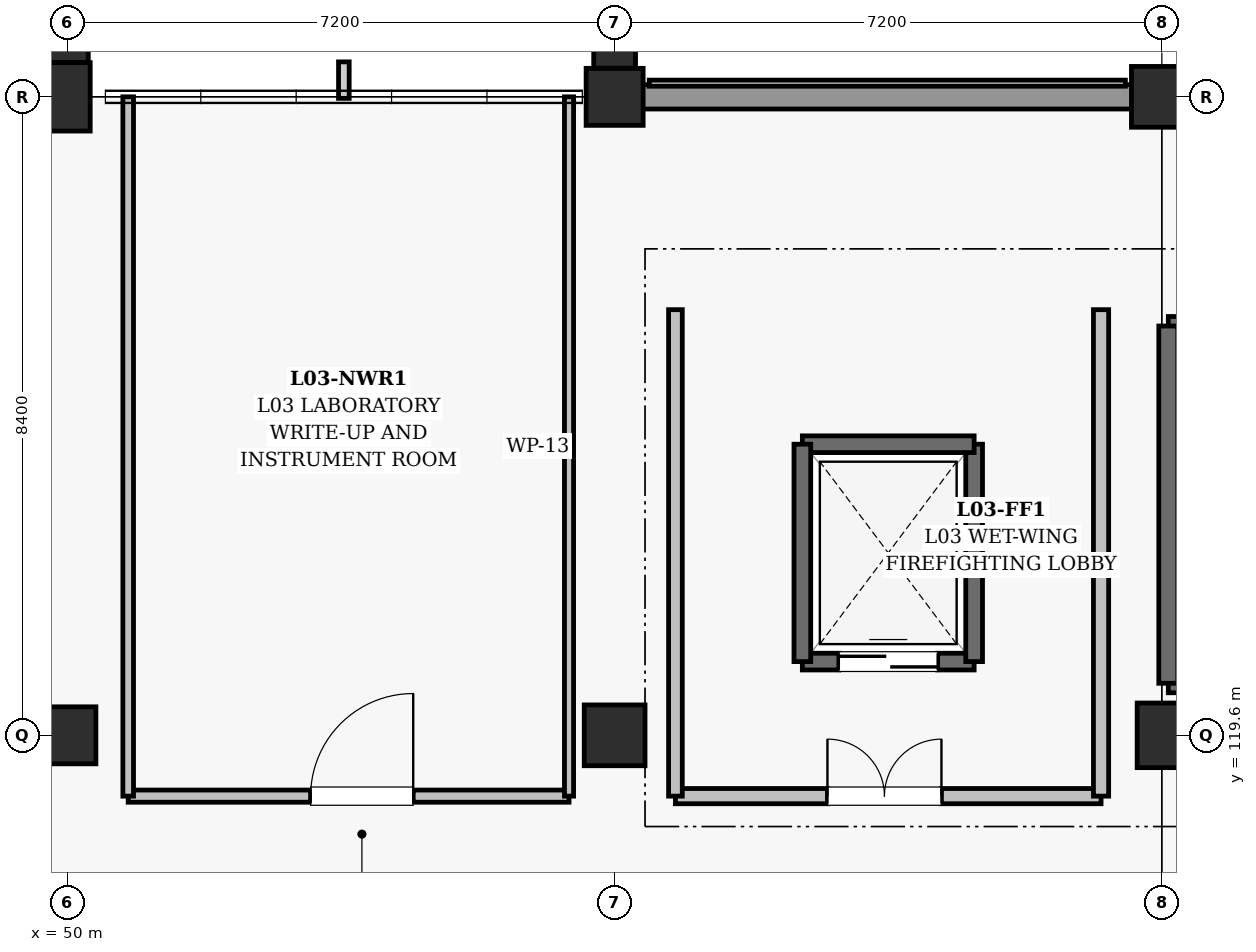
"""IFC4 building model, lengths in metres.
Left out: names, types, materials, properties, quantities, classifications, styles, units other than length and angle.
Written with IfcOpenShell. Run it as: python <this file> out.ifc"""

import sys

from ifc_helpers import new_model, si_unit, direction, frame, frame_2d, origin, origin_2d, place, context, subcontext, project, spatial, rectangle, extrude, element, fill, save


model = new_model("IFC4")
c1 = context("Model", 3, precision=1e-05, world=origin(), true_north=direction((0.0, 1.0)))
c2 = subcontext(c1, "Body", "Model", "MODEL_VIEW")
j1 = project(units=[si_unit("LENGTHUNIT", "METRE"), si_unit("PLANEANGLEUNIT", "RADIAN")], contexts=[c1])
p1 = place(None, origin())
s1 = spatial("IfcSite", under=j1, at=p1, CompositionType="ELEMENT")
p2 = place(p1, origin())
s2 = spatial("IfcBuilding", under=s1, at=p2, CompositionType="ELEMENT")
p3 = place(p2, frame((0.0, 0.0, 14.4)))
s3 = spatial("IfcBuildingStorey", under=s2, at=p3, CompositionType="ELEMENT", Elevation=14.4)
p4 = place(p3, frame((50.0, 119.6, 0.0), z_axis=(0.0, 0.0, 1.0), x_axis=(1.0, 0.0, 0.0)))
e1 = element("IfcColumn", 1, at=p4, inside=s3, PredefinedType="COLUMN", context=c2, shape_type="SweptSolid", body=[
    extrude(rectangle(XDim=0.75, YDim=0.75, at=origin_2d()), origin(), (0.0, 0.0, 1.0), 4.5),
])
p5 = place(p3, frame((50.0, 128.0, 0.0), z_axis=(0.0, 0.0, 1.0), x_axis=(1.0, 0.0, 0.0)))
e2 = element("IfcColumn", 2, at=p5, inside=s3, PredefinedType="COLUMN", context=c2, shape_type="SweptSolid", body=[
    extrude(rectangle(XDim=0.6, YDim=0.9, at=origin_2d()), origin(), (0.0, 0.0, 1.0), 4.5),
])
p6 = place(p3, frame((57.2, 119.6, 0.0), z_axis=(0.0, 0.0, 1.0), x_axis=(1.0, 0.0, 0.0)))
e3 = element("IfcColumn", 3, at=p6, inside=s3, PredefinedType="COLUMN", context=c2, shape_type="SweptSolid", body=[
    extrude(rectangle(XDim=0.8, YDim=0.8, at=origin_2d()), origin(), (0.0, 0.0, 1.0), 4.5),
])
p7 = place(p3, frame((57.2, 128.0, 0.0), z_axis=(0.0, 0.0, 1.0), x_axis=(1.0, 0.0, 0.0)))
e4 = element("IfcColumn", 4, at=p7, inside=s3, PredefinedType="COLUMN", context=c2, shape_type="SweptSolid", body=[
    extrude(rectangle(XDim=0.75, YDim=0.75, at=origin_2d()), origin(), (0.0, 0.0, 1.0), 4.5),
])
p8 = place(p3, frame((64.4, 119.6, 0.0), z_axis=(0.0, 0.0, 1.0), x_axis=(1.0, 0.0, 0.0)))
e5 = element("IfcColumn", 5, at=p8, inside=s3, PredefinedType="COLUMN", context=c2, shape_type="SweptSolid", body=[
    extrude(rectangle(XDim=0.65, YDim=0.85, at=origin_2d()), origin(), (0.0, 0.0, 1.0), 4.5),
])
p9 = place(p3, frame((64.4, 128.0, 0.0), z_axis=(0.0, 0.0, 1.0), x_axis=(1.0, 0.0, 0.0)))
e6 = element("IfcColumn", 6, at=p9, inside=s3, PredefinedType="COLUMN", context=c2, shape_type="SweptSolid", body=[
    extrude(rectangle(XDim=0.8, YDim=0.8, at=origin_2d()), origin(), (0.0, 0.0, 1.0), 4.5),
])
for number, where, z_axis, x_axis in (
    (7, (50.0, 128.853, 0.0), (0.0, 0.0, 1.0), (1.0, 0.0, 0.0)),
    (8, (57.2, 128.778, 0.0), (0.0, 0.0, 1.0), (1.0, 0.0, 0.0)),
):
    element("IfcColumn", number, at=place(p3, frame(where, z_axis=z_axis, x_axis=x_axis)), inside=s3, PredefinedType="PILASTER", context=c2, shape_type="SweptSolid", body=[
        extrude(rectangle(XDim=0.55, YDim=0.8, at=origin_2d()), origin(), (0.0, 0.0, 1.0), 4.5),
    ])
p10 = place(p3, frame((57.555, 128.0, 0.0), z_axis=(0.0, 0.0, 1.0), x_axis=(1.0, 0.0, 0.0)))
e9 = element("IfcWall", 9, at=p10, inside=s3, PredefinedType="SOLIDWALL", context=c2, shape_type="SweptSolid", body=[
    extrude(rectangle(XDim=6.465, YDim=0.32, at=frame_2d((3.232, 0.0))), origin(), (0.0, 0.0, 1.0), 3.305),
])
p11 = place(p3, frame((64.485, 120.285, 0.0), z_axis=(0.0, 0.0, 1.0), x_axis=(1.0, 0.0, 0.0)))
e10 = element("IfcWall", 10, at=p11, inside=s3, PredefinedType="SHEAR", context=c2, shape_type="SweptSolid", body=[
    extrude(rectangle(XDim=10.63, YDim=0.25, at=frame_2d((5.315, 0.0))), origin(), (0.0, 0.0, 1.0), 4.175),
])
p12 = place(p11, frame((0.55, 0.0, 0.0)))
e11 = element("IfcOpeningElement", 11, at=p12, cuts=e10, PredefinedType="OPENING", context=c2, shape_type="SweptSolid", body=[
    extrude(rectangle(XDim=1.2, YDim=2.15, at=frame_2d((0.6, 1.075))), frame((0.0, 0.135, 0.0), z_axis=(0.0, -1.0, 0.0), x_axis=(1.0, 0.0, 0.0)), (0.0, 0.0, 1.0), 0.27),
])
p13 = place(p3, frame((75.115, 124.985, 0.0), z_axis=(0.0, 0.0, 1.0), x_axis=(-1.0, 0.0, 0.0)))
e12 = element("IfcWall", 12, at=p13, inside=s3, PredefinedType="SHEAR", context=c2, shape_type="SweptSolid", body=[
    extrude(rectangle(XDim=10.63, YDim=0.25, at=frame_2d((5.315, 0.0))), origin(), (0.0, 0.0, 1.0), 4.175),
])
p14 = place(p3, frame((64.485, 124.985, 0.0), z_axis=(0.0, 0.0, 1.0), x_axis=(0.0, -1.0, 0.0)))
e13 = element("IfcWall", 13, at=p14, inside=s3, PredefinedType="SHEAR", context=c2, shape_type="SweptSolid", body=[
    extrude(rectangle(XDim=4.7, YDim=0.25, at=frame_2d((2.35, 0.0))), origin(), (0.0, 0.0, 1.0), 4.175),
])
p15 = place(p3, frame((59.67, 120.57, 0.0), z_axis=(0.0, 0.0, 1.0), x_axis=(1.0, 0.0, 0.0)))
e14 = element("IfcWall", 14, at=p15, inside=s3, PredefinedType="SHEAR", context=c2, shape_type="SweptSolid", body=[
    extrude(rectangle(XDim=2.26, YDim=0.22, at=frame_2d((1.13, 0.0))), origin(), (0.0, 0.0, 1.0), 4.175),
])
p16 = place(p15, frame((0.48, 0.0, 0.0)))
e15 = element("IfcOpeningElement", 15, at=p16, cuts=e14, PredefinedType="OPENING", context=c2, shape_type="SweptSolid", body=[
    extrude(rectangle(XDim=1.3, YDim=2.2, at=frame_2d((0.65, 1.1))), frame((0.0, 0.12, 0.0), z_axis=(0.0, -1.0, 0.0), x_axis=(1.0, 0.0, 0.0)), (0.0, 0.0, 1.0), 0.24),
])
p17 = place(p3, frame((61.93, 120.57, 0.0), z_axis=(0.0, 0.0, 1.0), x_axis=(0.0, 1.0, 0.0)))
e16 = element("IfcWall", 16, at=p17, inside=s3, PredefinedType="SHEAR", context=c2, shape_type="SweptSolid", body=[
    extrude(rectangle(XDim=2.86, YDim=0.22, at=frame_2d((1.43, 0.0))), origin(), (0.0, 0.0, 1.0), 4.175),
])
p18 = place(p3, frame((61.93, 123.43, 0.0), z_axis=(0.0, 0.0, 1.0), x_axis=(-1.0, 0.0, 0.0)))
e17 = element("IfcWall", 17, at=p18, inside=s3, PredefinedType="SHEAR", context=c2, shape_type="SweptSolid", body=[
    extrude(rectangle(XDim=2.26, YDim=0.22, at=frame_2d((1.13, 0.0))), origin(), (0.0, 0.0, 1.0), 4.175),
])
p19 = place(p3, frame((59.67, 123.43, 0.0), z_axis=(0.0, 0.0, 1.0), x_axis=(0.0, -1.0, 0.0)))
e18 = element("IfcWall", 18, at=p19, inside=s3, PredefinedType="SHEAR", context=c2, shape_type="SweptSolid", body=[
    extrude(rectangle(XDim=2.86, YDim=0.22, at=frame_2d((1.43, 0.0))), origin(), (0.0, 0.0, 1.0), 4.175),
])
p20 = place(p3, frame((58.0, 118.8, 0.0), z_axis=(0.0, 0.0, 1.0), x_axis=(1.0, 0.0, 0.0)))
e19 = element("IfcWall", 19, at=p20, inside=s3, PredefinedType="SOLIDWALL", context=c2, shape_type="SweptSolid", body=[
    extrude(rectangle(XDim=5.6, YDim=0.2, at=frame_2d((2.8, 0.0))), origin(), (0.0, 0.0, 1.0), 3.54),
])
p21 = place(p20, frame((2.0, 0.0, 0.0)))
e20 = element("IfcOpeningElement", 20, at=p21, cuts=e19, PredefinedType="OPENING", context=c2, shape_type="SweptSolid", body=[
    extrude(rectangle(XDim=1.5, YDim=2.2, at=frame_2d((0.75, 1.1))), frame((0.0, 0.11, 0.0), z_axis=(0.0, -1.0, 0.0), x_axis=(1.0, 0.0, 0.0)), (0.0, 0.0, 1.0), 0.22),
])
p22 = place(p3, frame((58.0, 118.8, 0.0), z_axis=(0.0, 0.0, 1.0), x_axis=(0.0, 1.0, 0.0)))
e21 = element("IfcWall", 21, at=p22, inside=s3, PredefinedType="SOLIDWALL", context=c2, shape_type="SweptSolid", body=[
    extrude(rectangle(XDim=6.4, YDim=0.18, at=frame_2d((3.2, 0.0))), origin(), (0.0, 0.0, 1.0), 3.36),
])
p23 = place(p3, frame((63.6, 118.8, 0.0), z_axis=(0.0, 0.0, 1.0), x_axis=(0.0, 1.0, 0.0)))
e22 = element("IfcWall", 22, at=p23, inside=s3, PredefinedType="SOLIDWALL", context=c2, shape_type="SweptSolid", body=[
    extrude(rectangle(XDim=6.4, YDim=0.2, at=frame_2d((3.2, 0.0))), origin(), (0.0, 0.0, 1.0), 3.36),
])
p24 = place(p3, frame((50.8, 118.8, 0.0), z_axis=(0.0, 0.0, 1.0), x_axis=(1.0, 0.0, 0.0)))
e23 = element("IfcWall", 23, at=p24, inside=s3, PredefinedType="PARTITIONING", context=c2, shape_type="SweptSolid", body=[
    extrude(rectangle(XDim=5.8, YDim=0.16, at=frame_2d((2.9, 0.0))), origin(), (0.0, 0.0, 1.0), 3.54),
])
p25 = place(p24, frame((2.4, 0.0, 0.0)))
e24 = element("IfcOpeningElement", 24, at=p25, cuts=e23, PredefinedType="OPENING", context=c2, shape_type="SweptSolid", body=[
    extrude(rectangle(XDim=1.35, YDim=2.2, at=frame_2d((0.675, 1.1))), frame((0.0, 0.09, 0.0), z_axis=(0.0, -1.0, 0.0), x_axis=(1.0, 0.0, 0.0)), (0.0, 0.0, 1.0), 0.18),
])
p26 = place(p3, frame((50.8, 118.8, 0.0), z_axis=(0.0, 0.0, 1.0), x_axis=(0.0, 1.0, 0.0)))
e25 = element("IfcWall", 25, at=p26, inside=s3, PredefinedType="PARTITIONING", context=c2, shape_type="SweptSolid", body=[
    extrude(rectangle(XDim=9.2, YDim=0.14, at=frame_2d((4.6, 0.0))), origin(), (0.0, 0.0, 1.0), 3.41),
])
p27 = place(p3, frame((56.6, 118.8, 0.0), z_axis=(0.0, 0.0, 1.0), x_axis=(0.0, 1.0, 0.0)))
e26 = element("IfcWall", 26, at=p27, inside=s3, PredefinedType="PARTITIONING", context=c2, shape_type="SweptSolid", body=[
    extrude(rectangle(XDim=9.2, YDim=0.12, at=frame_2d((4.6, 0.0))), origin(), (0.0, 0.0, 1.0), 3.41),
])
p28 = place(p16, origin())
e27 = element("IfcDoor", 27, at=p28, inside=s3, OperationType="DOUBLE_DOOR_SLIDING", PredefinedType="DOOR", context=c2, shape_type="SweptSolid", body=[
    extrude(rectangle(XDim=1.3, YDim=2.2, at=frame_2d((0.65, 1.1))), frame((0.0, 0.025, 0.0), z_axis=(0.0, -1.0, 0.0), x_axis=(1.0, 0.0, 0.0)), (0.0, 0.0, 1.0), 0.05),
])
fill(e15, e27)
p29 = place(p21, origin())
e28 = element("IfcDoor", 28, at=p29, inside=s3, OperationType="DOUBLE_DOOR_SINGLE_SWING", PredefinedType="DOOR", context=c2, shape_type="SweptSolid", body=[
    extrude(rectangle(XDim=1.5, YDim=2.2, at=frame_2d((0.75, 1.1))), frame((0.0, 0.025, 0.0), z_axis=(0.0, -1.0, 0.0), x_axis=(1.0, 0.0, 0.0)), (0.0, 0.0, 1.0), 0.05),
])
fill(e20, e28)
p30 = place(p25, origin())
e29 = element("IfcDoor", 29, at=p30, inside=s3, OperationType="SINGLE_SWING_RIGHT", PredefinedType="DOOR", context=c2, shape_type="SweptSolid", body=[
    extrude(rectangle(XDim=1.35, YDim=2.2, at=frame_2d((0.675, 1.1))), frame((0.0, 0.025, 0.0), z_axis=(0.0, -1.0, 0.0), x_axis=(1.0, 0.0, 0.0)), (0.0, 0.0, 1.0), 0.05),
])
fill(e24, e29)
save(model, sys.argv[1])
